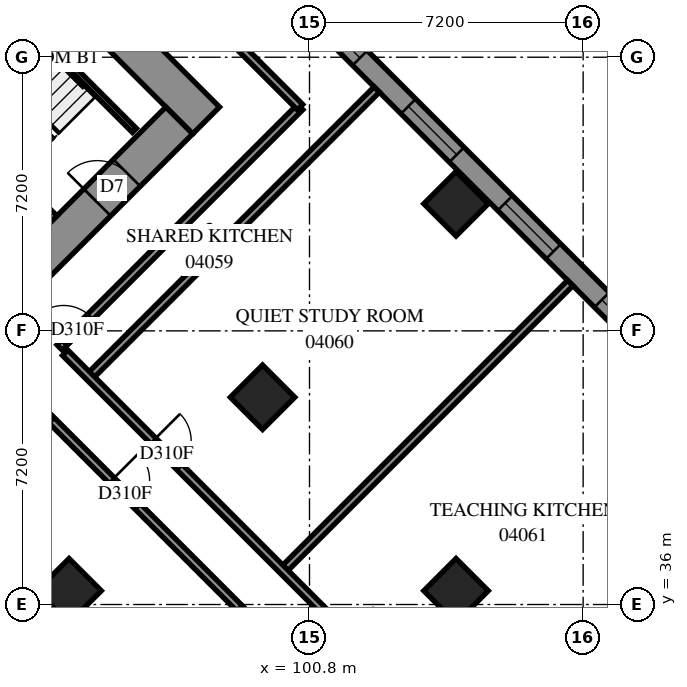
"""IFC4 building model, lengths in metres.
Left out: names, types, materials, properties, quantities, classifications, styles, units other than length and angle.
Written with IfcOpenShell. Run it as: python <this file> out.ifc"""

import sys

from ifc_helpers import new_model, si_unit, direction, frame, frame_2d, origin, origin_2d, place, context, subcontext, project, spatial, polyline, rectangle, outline, extrude, element, fill, save


model = new_model("IFC4")
c1 = context("Model", 3, precision=1e-05, world=origin(), true_north=direction((0.0, 1.0)))
c2 = subcontext(c1, "Body", "Model", "MODEL_VIEW")
j1 = project(units=[si_unit("LENGTHUNIT", "METRE"), si_unit("PLANEANGLEUNIT", "RADIAN")], contexts=[c1])
p1 = place(None, origin())
s1 = spatial("IfcSite", under=j1, at=p1, CompositionType="ELEMENT")
p2 = place(p1, origin())
s2 = spatial("IfcBuilding", under=s1, at=p2, CompositionType="ELEMENT")
p3 = place(p2, frame((0.0, 0.0, 18.6)))
s3 = spatial("IfcBuildingStorey", under=s2, at=p3, CompositionType="ELEMENT", Elevation=18.6)
for number, where, z_axis, x_axis in (
    (1, (104.656, 46.544, 0.0), (0.0, 0.0, 1.0), (0.707, -0.707, 0.0)),
    (2, (99.565, 41.453, 0.0), (0.0, 0.0, 1.0), (0.707, -0.707, 0.0)),
    (3, (94.474, 36.362, 0.0), (0.0, 0.0, 1.0), (0.707, -0.707, 0.0)),
    (4, (104.656, 36.362, 0.0), (0.0, 0.0, 1.0), (0.707, -0.707, 0.0)),
):
    element("IfcColumn", number, at=place(p3, frame(where, z_axis=z_axis, x_axis=x_axis)), inside=s3, PredefinedType="COLUMN", context=c2, shape_type="SweptSolid", body=[
        extrude(rectangle(XDim=1.2, YDim=1.2, at=origin_2d()), origin(), (0.0, 0.0, 1.0), 3.8),
    ])
p4 = place(p3, frame((86.483, 60.333, -0.4), z_axis=(0.0, 0.0, 1.0), x_axis=(0.70710983, -0.7071037324, 0.0)))
e5 = element("IfcWall", 5, at=p4, inside=s3, PredefinedType="SHEAR", context=c2, shape_type="SweptSolid", body=[
    extrude(rectangle(XDim=16.4, YDim=1.0, at=frame_2d((8.2, 0.0))), origin(), (0.0, 0.0, 1.0), 3.5),
])
p5 = place(p4, frame((11.0, 0.0, 0.4)))
e6 = element("IfcOpeningElement", 6, at=p5, cuts=e5, PredefinedType="OPENING", context=c2, shape_type="SweptSolid", body=[
    extrude(rectangle(XDim=0.8, YDim=2.1, at=frame_2d((0.4, 1.05))), frame((0.0, 0.51, 0.0), z_axis=(0.0, -1.0, 0.0), x_axis=(1.0, 0.0, 0.0)), (0.0, 0.0, 1.0), 1.02),
])
p6 = place(p3, frame((87.19, 38.554, -0.4), z_axis=(0.0, 0.0, 1.0), x_axis=(0.707103309, 0.7071102534, 0.0)))
e7 = element("IfcWall", 7, at=p6, inside=s3, PredefinedType="SHEAR", context=c2, shape_type="SweptSolid", body=[
    extrude(rectangle(XDim=14.4, YDim=1.0, at=frame_2d((7.2, 0.0))), origin(), (0.0, 0.0, 1.0), 3.5),
])
p7 = place(p6, frame((4.55, 0.0, 0.4)))
e8 = element("IfcOpeningElement", 8, at=p7, cuts=e7, PredefinedType="OPENING", context=c2, shape_type="SweptSolid", body=[
    extrude(rectangle(XDim=1.1, YDim=2.1, at=frame_2d((0.55, 1.05))), frame((0.0, 0.51, 0.0), z_axis=(0.0, -1.0, 0.0), x_axis=(1.0, 0.0, 0.0)), (0.0, 0.0, 1.0), 1.02),
])
p8 = place(p6, frame((11.35, 0.0, 0.4)))
e9 = element("IfcOpeningElement", 9, at=p8, cuts=e7, PredefinedType="OPENING", context=c2, shape_type="SweptSolid", body=[
    extrude(rectangle(XDim=1.1, YDim=2.1, at=frame_2d((0.55, 1.05))), frame((0.0, 0.51, 0.0), z_axis=(0.0, -1.0, 0.0), x_axis=(1.0, 0.0, 0.0)), (0.0, 0.0, 1.0), 1.02),
])
p9 = place(p3, frame((88.958, 51.211, 0.0), z_axis=(0.0, 0.0, 1.0), x_axis=(0.7070998367, -0.7071137256, 0.0)))
e10 = element("IfcWall", 10, at=p9, inside=s3, PredefinedType="SOLIDWALL", context=c2, shape_type="SweptSolid", body=[
    extrude(rectangle(XDim=7.2, YDim=0.3, at=frame_2d((3.6, 0.0))), origin(), (0.0, 0.0, 1.0), 3.8),
])
p10 = place(p3, frame((117.843, 34.665, 0.0), z_axis=(0.0, 0.0, 1.0), x_axis=(-0.7071067812, 0.7071067812, 0.0)))
e11 = element("IfcWall", 11, at=p10, inside=s3, PredefinedType="SOLIDWALL", context=c2, shape_type="SweptSolid", body=[
    extrude(outline(polyline([(-0.275, -0.275), (54.222, -0.275), (53.994, 0.275), (0.275, 0.275), (-0.275, -0.275)])), origin(), (0.0, 0.0, 1.0), 3.8),
])
p11 = place(p10, frame((0.8, 0.0, 0.7)))
e12 = element("IfcOpeningElement", 12, at=p11, cuts=e11, PredefinedType="OPENING", context=c2, shape_type="SweptSolid", body=[
    extrude(rectangle(XDim=1.8, YDim=2.4, at=frame_2d((0.9, 1.2))), frame((0.0, 0.285, 0.0), z_axis=(0.0, -1.0, 0.0), x_axis=(1.0, 0.0, 0.0)), (0.0, 0.0, 1.0), 0.57),
])
p12 = place(p10, frame((4.225, 0.0, 0.7)))
e13 = element("IfcOpeningElement", 13, at=p12, cuts=e11, PredefinedType="OPENING", context=c2, shape_type="SweptSolid", body=[
    extrude(rectangle(XDim=1.8, YDim=2.4, at=frame_2d((0.9, 1.2))), frame((0.0, 0.285, 0.0), z_axis=(0.0, -1.0, 0.0), x_axis=(1.0, 0.0, 0.0)), (0.0, 0.0, 1.0), 0.57),
])
p13 = place(p10, frame((7.825, 0.0, 0.7)))
e14 = element("IfcOpeningElement", 14, at=p13, cuts=e11, PredefinedType="OPENING", context=c2, shape_type="SweptSolid", body=[
    extrude(rectangle(XDim=1.8, YDim=2.4, at=frame_2d((0.9, 1.2))), frame((0.0, 0.285, 0.0), z_axis=(0.0, -1.0, 0.0), x_axis=(1.0, 0.0, 0.0)), (0.0, 0.0, 1.0), 0.57),
])
p14 = place(p10, frame((11.425, 0.0, 0.7)))
e15 = element("IfcOpeningElement", 15, at=p14, cuts=e11, PredefinedType="OPENING", context=c2, shape_type="SweptSolid", body=[
    extrude(rectangle(XDim=1.8, YDim=2.4, at=frame_2d((0.9, 1.2))), frame((0.0, 0.285, 0.0), z_axis=(0.0, -1.0, 0.0), x_axis=(1.0, 0.0, 0.0)), (0.0, 0.0, 1.0), 0.57),
])
p15 = place(p10, frame((15.025, 0.0, 0.7)))
e16 = element("IfcOpeningElement", 16, at=p15, cuts=e11, PredefinedType="OPENING", context=c2, shape_type="SweptSolid", body=[
    extrude(rectangle(XDim=1.8, YDim=2.4, at=frame_2d((0.9, 1.2))), frame((0.0, 0.285, 0.0), z_axis=(0.0, -1.0, 0.0), x_axis=(1.0, 0.0, 0.0)), (0.0, 0.0, 1.0), 0.57),
])
p16 = place(p10, frame((18.625, 0.0, 0.7)))
e17 = element("IfcOpeningElement", 17, at=p16, cuts=e11, PredefinedType="OPENING", context=c2, shape_type="SweptSolid", body=[
    extrude(rectangle(XDim=1.8, YDim=2.4, at=frame_2d((0.9, 1.2))), frame((0.0, 0.285, 0.0), z_axis=(0.0, -1.0, 0.0), x_axis=(1.0, 0.0, 0.0)), (0.0, 0.0, 1.0), 0.57),
])
p17 = place(p10, frame((22.225, 0.0, 0.7)))
e18 = element("IfcOpeningElement", 18, at=p17, cuts=e11, PredefinedType="OPENING", context=c2, shape_type="SweptSolid", body=[
    extrude(rectangle(XDim=1.8, YDim=2.4, at=frame_2d((0.9, 1.2))), frame((0.0, 0.285, 0.0), z_axis=(0.0, -1.0, 0.0), x_axis=(1.0, 0.0, 0.0)), (0.0, 0.0, 1.0), 0.57),
])
p18 = place(p10, frame((25.825, 0.0, 0.7)))
e19 = element("IfcOpeningElement", 19, at=p18, cuts=e11, PredefinedType="OPENING", context=c2, shape_type="SweptSolid", body=[
    extrude(rectangle(XDim=1.8, YDim=2.4, at=frame_2d((0.9, 1.2))), frame((0.0, 0.285, 0.0), z_axis=(0.0, -1.0, 0.0), x_axis=(1.0, 0.0, 0.0)), (0.0, 0.0, 1.0), 0.57),
])
p19 = place(p10, frame((29.425, 0.0, 0.7)))
e20 = element("IfcOpeningElement", 20, at=p19, cuts=e11, PredefinedType="OPENING", context=c2, shape_type="SweptSolid", body=[
    extrude(rectangle(XDim=1.8, YDim=2.4, at=frame_2d((0.9, 1.2))), frame((0.0, 0.285, 0.0), z_axis=(0.0, -1.0, 0.0), x_axis=(1.0, 0.0, 0.0)), (0.0, 0.0, 1.0), 0.57),
])
p20 = place(p10, frame((33.025, 0.0, 0.7)))
e21 = element("IfcOpeningElement", 21, at=p20, cuts=e11, PredefinedType="OPENING", context=c2, shape_type="SweptSolid", body=[
    extrude(rectangle(XDim=1.8, YDim=2.4, at=frame_2d((0.9, 1.2))), frame((0.0, 0.285, 0.0), z_axis=(0.0, -1.0, 0.0), x_axis=(1.0, 0.0, 0.0)), (0.0, 0.0, 1.0), 0.57),
])
p21 = place(p10, frame((36.625, 0.0, 0.7)))
e22 = element("IfcOpeningElement", 22, at=p21, cuts=e11, PredefinedType="OPENING", context=c2, shape_type="SweptSolid", body=[
    extrude(rectangle(XDim=1.8, YDim=2.4, at=frame_2d((0.9, 1.2))), frame((0.0, 0.285, 0.0), z_axis=(0.0, -1.0, 0.0), x_axis=(1.0, 0.0, 0.0)), (0.0, 0.0, 1.0), 0.57),
])
p22 = place(p10, frame((40.225, 0.0, 0.7)))
e23 = element("IfcOpeningElement", 23, at=p22, cuts=e11, PredefinedType="OPENING", context=c2, shape_type="SweptSolid", body=[
    extrude(rectangle(XDim=1.8, YDim=2.4, at=frame_2d((0.9, 1.2))), frame((0.0, 0.285, 0.0), z_axis=(0.0, -1.0, 0.0), x_axis=(1.0, 0.0, 0.0)), (0.0, 0.0, 1.0), 0.57),
])
p23 = place(p10, frame((43.825, 0.0, 0.7)))
e24 = element("IfcOpeningElement", 24, at=p23, cuts=e11, PredefinedType="OPENING", context=c2, shape_type="SweptSolid", body=[
    extrude(rectangle(XDim=1.8, YDim=2.4, at=frame_2d((0.9, 1.2))), frame((0.0, 0.285, 0.0), z_axis=(0.0, -1.0, 0.0), x_axis=(1.0, 0.0, 0.0)), (0.0, 0.0, 1.0), 0.57),
])
p24 = place(p10, frame((47.425, 0.0, 0.7)))
e25 = element("IfcOpeningElement", 25, at=p24, cuts=e11, PredefinedType="OPENING", context=c2, shape_type="SweptSolid", body=[
    extrude(rectangle(XDim=1.8, YDim=2.4, at=frame_2d((0.9, 1.2))), frame((0.0, 0.285, 0.0), z_axis=(0.0, -1.0, 0.0), x_axis=(1.0, 0.0, 0.0)), (0.0, 0.0, 1.0), 0.57),
])
p25 = place(p10, frame((51.06, 0.0, 0.7)))
e26 = element("IfcOpeningElement", 26, at=p25, cuts=e11, PredefinedType="OPENING", context=c2, shape_type="SweptSolid", body=[
    extrude(rectangle(XDim=1.8, YDim=2.4, at=frame_2d((0.9, 1.2))), frame((0.0, 0.285, 0.0), z_axis=(0.0, -1.0, 0.0), x_axis=(1.0, 0.0, 0.0)), (0.0, 0.0, 1.0), 0.57),
])
p26 = place(p3, frame((77.07, 42.275, 0.0), z_axis=(0.0, 0.0, 1.0), x_axis=(0.7071067812, -0.7071067812, 0.0)))
e27 = element("IfcWall", 27, at=p26, inside=s3, PredefinedType="SOLIDWALL", context=c2, shape_type="SweptSolid", body=[
    extrude(outline(polyline([(0.114, -0.275), (39.288, -0.275), (38.737, 0.275), (-0.114, 0.275), (0.114, -0.275)])), origin(), (0.0, 0.0, 1.0), 3.8),
])
p27 = place(p26, frame((2.837, 0.0, 0.7)))
e28 = element("IfcOpeningElement", 28, at=p27, cuts=e27, PredefinedType="OPENING", context=c2, shape_type="SweptSolid", body=[
    extrude(rectangle(XDim=1.8, YDim=2.4, at=frame_2d((0.9, 1.2))), frame((0.0, 0.285, 0.0), z_axis=(0.0, -1.0, 0.0), x_axis=(1.0, 0.0, 0.0)), (0.0, 0.0, 1.0), 0.57),
])
p28 = place(p26, frame((6.588, 0.0, 0.7)))
e29 = element("IfcOpeningElement", 29, at=p28, cuts=e27, PredefinedType="OPENING", context=c2, shape_type="SweptSolid", body=[
    extrude(rectangle(XDim=1.8, YDim=2.4, at=frame_2d((0.9, 1.2))), frame((0.0, 0.285, 0.0), z_axis=(0.0, -1.0, 0.0), x_axis=(1.0, 0.0, 0.0)), (0.0, 0.0, 1.0), 0.57),
])
p29 = place(p26, frame((10.188, 0.0, 0.7)))
e30 = element("IfcOpeningElement", 30, at=p29, cuts=e27, PredefinedType="OPENING", context=c2, shape_type="SweptSolid", body=[
    extrude(rectangle(XDim=1.8, YDim=2.4, at=frame_2d((0.9, 1.2))), frame((0.0, 0.285, 0.0), z_axis=(0.0, -1.0, 0.0), x_axis=(1.0, 0.0, 0.0)), (0.0, 0.0, 1.0), 0.57),
])
p30 = place(p26, frame((13.787, 0.0, 0.7)))
e31 = element("IfcOpeningElement", 31, at=p30, cuts=e27, PredefinedType="OPENING", context=c2, shape_type="SweptSolid", body=[
    extrude(rectangle(XDim=1.8, YDim=2.4, at=frame_2d((0.9, 1.2))), frame((0.0, 0.285, 0.0), z_axis=(0.0, -1.0, 0.0), x_axis=(1.0, 0.0, 0.0)), (0.0, 0.0, 1.0), 0.57),
])
p31 = place(p26, frame((17.387, 0.0, 0.7)))
e32 = element("IfcOpeningElement", 32, at=p31, cuts=e27, PredefinedType="OPENING", context=c2, shape_type="SweptSolid", body=[
    extrude(rectangle(XDim=1.8, YDim=2.4, at=frame_2d((0.9, 1.2))), frame((0.0, 0.285, 0.0), z_axis=(0.0, -1.0, 0.0), x_axis=(1.0, 0.0, 0.0)), (0.0, 0.0, 1.0), 0.57),
])
p32 = place(p26, frame((20.988, 0.0, 0.7)))
e33 = element("IfcOpeningElement", 33, at=p32, cuts=e27, PredefinedType="OPENING", context=c2, shape_type="SweptSolid", body=[
    extrude(rectangle(XDim=1.8, YDim=2.4, at=frame_2d((0.9, 1.2))), frame((0.0, 0.285, 0.0), z_axis=(0.0, -1.0, 0.0), x_axis=(1.0, 0.0, 0.0)), (0.0, 0.0, 1.0), 0.57),
])
p33 = place(p26, frame((24.587, 0.0, 0.7)))
e34 = element("IfcOpeningElement", 34, at=p33, cuts=e27, PredefinedType="OPENING", context=c2, shape_type="SweptSolid", body=[
    extrude(rectangle(XDim=1.8, YDim=2.4, at=frame_2d((0.9, 1.2))), frame((0.0, 0.285, 0.0), z_axis=(0.0, -1.0, 0.0), x_axis=(1.0, 0.0, 0.0)), (0.0, 0.0, 1.0), 0.57),
])
p34 = place(p26, frame((28.188, 0.0, 0.7)))
e35 = element("IfcOpeningElement", 35, at=p34, cuts=e27, PredefinedType="OPENING", context=c2, shape_type="SweptSolid", body=[
    extrude(rectangle(XDim=1.8, YDim=2.4, at=frame_2d((0.9, 1.2))), frame((0.0, 0.285, 0.0), z_axis=(0.0, -1.0, 0.0), x_axis=(1.0, 0.0, 0.0)), (0.0, 0.0, 1.0), 0.57),
])
p35 = place(p26, frame((31.788, 0.0, 0.7)))
e36 = element("IfcOpeningElement", 36, at=p35, cuts=e27, PredefinedType="OPENING", context=c2, shape_type="SweptSolid", body=[
    extrude(rectangle(XDim=1.8, YDim=2.4, at=frame_2d((0.9, 1.2))), frame((0.0, 0.285, 0.0), z_axis=(0.0, -1.0, 0.0), x_axis=(1.0, 0.0, 0.0)), (0.0, 0.0, 1.0), 0.57),
])
p36 = place(p26, frame((35.388, 0.0, 0.7)))
e37 = element("IfcOpeningElement", 37, at=p36, cuts=e27, PredefinedType="OPENING", context=c2, shape_type="SweptSolid", body=[
    extrude(rectangle(XDim=1.8, YDim=2.4, at=frame_2d((0.9, 1.2))), frame((0.0, 0.285, 0.0), z_axis=(0.0, -1.0, 0.0), x_axis=(1.0, 0.0, 0.0)), (0.0, 0.0, 1.0), 0.57),
])
p37 = place(p3, frame((91.313, 53.354, 0.0), z_axis=(0.0, 0.0, 1.0), x_axis=(0.7071140275, -0.7070995348, 0.0)))
e38 = element("IfcWall", 38, at=p37, inside=s3, PredefinedType="PARTITIONING", context=c2, shape_type="SweptSolid", body=[
    extrude(rectangle(XDim=6.9, YDim=0.15, at=frame_2d((3.45, 0.0))), origin(), (0.0, 0.0, 1.0), 3.8),
])
p38 = place(p3, frame((93.163, 41.697, 0.0), z_axis=(0.0, 0.0, 1.0), x_axis=(0.7071067812, -0.7071067812, 0.0)))
e39 = element("IfcWall", 39, at=p38, inside=s3, PredefinedType="PARTITIONING", context=c2, shape_type="SweptSolid", body=[
    extrude(rectangle(XDim=26.299, YDim=0.2, at=frame_2d((13.149, 0.0))), origin(), (0.0, 0.0, 1.0), 3.8),
])
p39 = place(p38, frame((3.437, 0.0, 0.0)))
e40 = element("IfcOpeningElement", 40, at=p39, cuts=e39, PredefinedType="OPENING", context=c2, shape_type="SweptSolid", body=[
    extrude(rectangle(XDim=1.0, YDim=2.1, at=frame_2d((0.5, 1.05))), frame((0.0, 0.11, 0.0), z_axis=(0.0, -1.0, 0.0), x_axis=(1.0, 0.0, 0.0)), (0.0, 0.0, 1.0), 0.22),
])
p40 = place(p38, frame((10.637, 0.0, 0.0)))
e41 = element("IfcOpeningElement", 41, at=p40, cuts=e39, PredefinedType="OPENING", context=c2, shape_type="SweptSolid", body=[
    extrude(rectangle(XDim=1.0, YDim=2.1, at=frame_2d((0.5, 1.05))), frame((0.0, 0.11, 0.0), z_axis=(0.0, -1.0, 0.0), x_axis=(1.0, 0.0, 0.0)), (0.0, 0.0, 1.0), 0.22),
])
p41 = place(p38, frame((16.024, 0.0, 0.0)))
e42 = element("IfcOpeningElement", 42, at=p41, cuts=e39, PredefinedType="OPENING", context=c2, shape_type="SweptSolid", body=[
    extrude(rectangle(XDim=1.0, YDim=2.1, at=frame_2d((0.5, 1.05))), frame((0.0, 0.11, 0.0), z_axis=(0.0, -1.0, 0.0), x_axis=(1.0, 0.0, 0.0)), (0.0, 0.0, 1.0), 0.22),
])
p42 = place(p38, frame((22.657, 0.0, 0.0)))
e43 = element("IfcOpeningElement", 43, at=p42, cuts=e39, PredefinedType="OPENING", context=c2, shape_type="SweptSolid", body=[
    extrude(rectangle(XDim=1.0, YDim=2.1, at=frame_2d((0.5, 1.05))), frame((0.0, 0.11, 0.0), z_axis=(0.0, -1.0, 0.0), x_axis=(1.0, 0.0, 0.0)), (0.0, 0.0, 1.0), 0.22),
])
for number, where, z_axis, x_axis in (
    (44, (95.003, 41.985, 0.0), (0.0, 0.0, 1.0), (0.707, 0.707, 0.0)),
    (45, (100.095, 36.893, 0.0), (0.0, 0.0, 1.0), (0.707, 0.707, 0.0)),
    (46, (105.186, 31.802, 0.0), (0.0, 0.0, 1.0), (0.707, 0.707, 0.0)),
):
    element("IfcWall", number, at=place(p3, frame(where, z_axis=z_axis, x_axis=x_axis)), inside=s3, PredefinedType="PARTITIONING", context=c2, shape_type="SweptSolid", body=[
        extrude(rectangle(XDim=10.699, YDim=0.2, at=frame_2d((5.35, 0.0))), origin(), (0.0, 0.0, 1.0), 3.8),
    ])
p43 = place(p3, frame((94.226, 42.762, 0.0), z_axis=(0.0, 0.0, 1.0), x_axis=(0.7071067812, 0.7071067812, 0.0)))
e47 = element("IfcWall", 47, at=p43, inside=s3, PredefinedType="PARTITIONING", context=c2, shape_type="SweptSolid", body=[
    extrude(rectangle(XDim=8.949, YDim=0.2, at=frame_2d((4.474, 0.0))), origin(), (0.0, 0.0, 1.0), 3.8),
])
p44 = place(p43, frame((0.149, 0.0, 0.0)))
e48 = element("IfcOpeningElement", 48, at=p44, cuts=e47, PredefinedType="OPENING", context=c2, shape_type="SweptSolid", body=[
    extrude(rectangle(XDim=1.0, YDim=2.1, at=frame_2d((0.5, 1.05))), frame((0.0, 0.11, 0.0), z_axis=(0.0, -1.0, 0.0), x_axis=(1.0, 0.0, 0.0)), (0.0, 0.0, 1.0), 0.22),
])
p45 = place(p3, frame((94.371, 42.623, 0.0), z_axis=(0.0, 0.0, 1.0), x_axis=(0.7071067812, -0.7071067812, 0.0)))
e49 = element("IfcWall", 49, at=p45, inside=s3, PredefinedType="PARTITIONING", context=c2, shape_type="SweptSolid", body=[
    extrude(outline(polyline([(0.0, -0.1), (11.7, -0.1), (11.7, 0.1), (0.0, 0.1), (0.0, -0.1)])), origin(), (0.0, 0.0, 1.0), 3.8),
])
p46 = place(p45, frame((3.274, 0.0, 0.0)))
e50 = element("IfcOpeningElement", 50, at=p46, cuts=e49, PredefinedType="OPENING", context=c2, shape_type="SweptSolid", body=[
    extrude(rectangle(XDim=1.0, YDim=2.1, at=frame_2d((0.5, 1.05))), frame((0.0, 0.11, 0.0), z_axis=(0.0, -1.0, 0.0), x_axis=(1.0, 0.0, 0.0)), (0.0, 0.0, 1.0), 0.22),
])
p47 = place(p45, frame((10.473, 0.0, 0.0)))
e51 = element("IfcOpeningElement", 51, at=p47, cuts=e49, PredefinedType="OPENING", context=c2, shape_type="SweptSolid", body=[
    extrude(rectangle(XDim=1.0, YDim=2.1, at=frame_2d((0.5, 1.05))), frame((0.0, 0.11, 0.0), z_axis=(0.0, -1.0, 0.0), x_axis=(1.0, 0.0, 0.0)), (0.0, 0.0, 1.0), 0.22),
])
p48 = place(p3, frame((98.783, 50.855, 0.0), z_axis=(0.0, 0.0, 1.0), x_axis=(0.7071067812, -0.7071067812, 0.0)))
e52 = element("IfcWall", 52, at=p48, inside=s3, PredefinedType="PARTITIONING", context=c2, shape_type="SweptSolid", body=[
    extrude(rectangle(XDim=2.5, YDim=0.2, at=frame_2d((1.25, 0.0))), origin(), (0.0, 0.0, 1.0), 3.8),
])
p49 = place(p14, origin())
e53 = element("IfcWindow", 53, at=p49, inside=s3, PartitioningType="SINGLE_PANEL", PredefinedType="WINDOW", context=c2, shape_type="SweptSolid", body=[
    extrude(rectangle(XDim=1.8, YDim=2.4, at=frame_2d((0.9, 1.2))), frame((0.0, 0.155, 0.0), z_axis=(0.0, -1.0, 0.0), x_axis=(1.0, 0.0, 0.0)), (0.0, 0.0, 1.0), 0.06),
])
fill(e15, e53)
p50 = place(p15, origin())
e54 = element("IfcWindow", 54, at=p50, inside=s3, PartitioningType="SINGLE_PANEL", PredefinedType="WINDOW", context=c2, shape_type="SweptSolid", body=[
    extrude(rectangle(XDim=1.8, YDim=2.4, at=frame_2d((0.9, 1.2))), frame((0.0, 0.155, 0.0), z_axis=(0.0, -1.0, 0.0), x_axis=(1.0, 0.0, 0.0)), (0.0, 0.0, 1.0), 0.06),
])
fill(e16, e54)
p51 = place(p16, origin())
e55 = element("IfcWindow", 55, at=p51, inside=s3, PartitioningType="SINGLE_PANEL", PredefinedType="WINDOW", context=c2, shape_type="SweptSolid", body=[
    extrude(rectangle(XDim=1.8, YDim=2.4, at=frame_2d((0.9, 1.2))), frame((0.0, 0.155, 0.0), z_axis=(0.0, -1.0, 0.0), x_axis=(1.0, 0.0, 0.0)), (0.0, 0.0, 1.0), 0.06),
])
fill(e17, e55)
p52 = place(p17, origin())
e56 = element("IfcWindow", 56, at=p52, inside=s3, PartitioningType="SINGLE_PANEL", PredefinedType="WINDOW", context=c2, shape_type="SweptSolid", body=[
    extrude(rectangle(XDim=1.8, YDim=2.4, at=frame_2d((0.9, 1.2))), frame((0.0, 0.155, 0.0), z_axis=(0.0, -1.0, 0.0), x_axis=(1.0, 0.0, 0.0)), (0.0, 0.0, 1.0), 0.06),
])
fill(e18, e56)
p53 = place(p8, origin())
e57 = element("IfcDoor", 57, at=p53, inside=s3, OperationType="SINGLE_SWING_RIGHT", PredefinedType="DOOR", context=c2, shape_type="SweptSolid", body=[
    extrude(rectangle(XDim=1.1, YDim=2.1, at=frame_2d((0.55, 1.05))), frame((0.0, 0.025, 0.0), z_axis=(0.0, -1.0, 0.0), x_axis=(1.0, 0.0, 0.0)), (0.0, 0.0, 1.0), 0.05),
])
fill(e9, e57)
p54 = place(p44, origin())
e58 = element("IfcDoor", 58, at=p54, inside=s3, OperationType="SINGLE_SWING_LEFT", PredefinedType="DOOR", context=c2, shape_type="SweptSolid", body=[
    extrude(rectangle(XDim=1.0, YDim=2.1, at=frame_2d((0.5, 1.05))), frame((0.0, 0.025, 0.0), z_axis=(0.0, -1.0, 0.0), x_axis=(1.0, 0.0, 0.0)), (0.0, 0.0, 1.0), 0.05),
])
fill(e48, e58)
p55 = place(p46, origin())
e59 = element("IfcDoor", 59, at=p55, inside=s3, OperationType="SINGLE_SWING_RIGHT", PredefinedType="DOOR", context=c2, shape_type="SweptSolid", body=[
    extrude(rectangle(XDim=1.0, YDim=2.1, at=frame_2d((0.5, 1.05))), frame((0.0, 0.025, 0.0), z_axis=(0.0, -1.0, 0.0), x_axis=(1.0, 0.0, 0.0)), (0.0, 0.0, 1.0), 0.05),
])
fill(e50, e59)
p56 = place(p39, origin())
e60 = element("IfcDoor", 60, at=p56, inside=s3, OperationType="SINGLE_SWING_LEFT", PredefinedType="DOOR", context=c2, shape_type="SweptSolid", body=[
    extrude(rectangle(XDim=1.0, YDim=2.1, at=frame_2d((0.5, 1.05))), frame((0.0, 0.025, 0.0), z_axis=(0.0, -1.0, 0.0), x_axis=(1.0, 0.0, 0.0)), (0.0, 0.0, 1.0), 0.05),
])
fill(e40, e60)
save(model, sys.argv[1])
